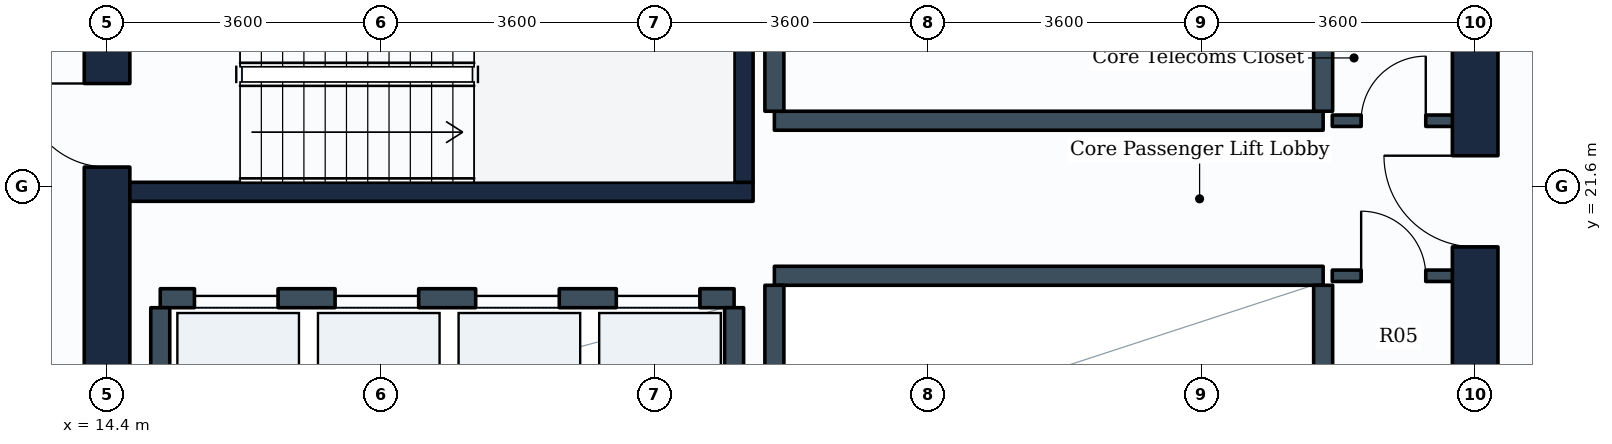
"""IFC4 building model, lengths in metres.
Left out: names, types, materials, properties, quantities, classifications, styles, units other than length and angle.
Written with IfcOpenShell. Run it as: python <this file> out.ifc"""

import sys

from ifc_helpers import new_model, si_unit, direction, frame, frame_2d, origin, place, context, subcontext, project, spatial, rectangle, extrude, element, fill, save


model = new_model("IFC4")
c1 = context("Model", 3, precision=1e-05, world=origin(), true_north=direction((0.0, 1.0)))
c2 = subcontext(c1, "Body", "Model", "MODEL_VIEW")
j1 = project(units=[si_unit("LENGTHUNIT", "METRE"), si_unit("PLANEANGLEUNIT", "RADIAN")], contexts=[c1])
p1 = place(None, origin())
s1 = spatial("IfcSite", under=j1, at=p1, CompositionType="ELEMENT")
p2 = place(p1, origin())
s2 = spatial("IfcBuilding", under=s1, at=p2, CompositionType="ELEMENT")
p3 = place(p2, frame((0.0, 0.0, 84.0)))
s3 = spatial("IfcBuildingStorey", under=s2, at=p3, CompositionType="ELEMENT", Elevation=84.0)
p4 = place(p3, frame((14.4, 10.8, 0.0), z_axis=(0.0, 0.0, 1.0), x_axis=(0.0, 1.0, 0.0)))
e1 = element("IfcWall", 1, at=p4, inside=s3, PredefinedType="SHEAR", context=c2, shape_type="SweptSolid", body=[
    extrude(rectangle(XDim=14.4, YDim=0.6, at=frame_2d((7.2, 0.0))), origin(), (0.0, 0.0, 1.0), 3.65),
])
p5 = place(p4, frame((11.05, 0.0, 0.0)))
e2 = element("IfcOpeningElement", 2, at=p5, cuts=e1, PredefinedType="OPENING", context=c2, shape_type="SweptSolid", body=[
    extrude(rectangle(XDim=1.1, YDim=2.1, at=frame_2d((0.55, 1.05))), frame((0.0, 0.31, 0.0), z_axis=(0.0, -1.0, 0.0), x_axis=(1.0, 0.0, 0.0)), (0.0, 0.0, 1.0), 0.62),
])
p6 = place(p4, frame((4.9, 0.0, 0.0)))
e3 = element("IfcOpeningElement", 3, at=p6, cuts=e1, PredefinedType="OPENING", context=c2, shape_type="SweptSolid", body=[
    extrude(rectangle(XDim=1.2, YDim=2.1, at=frame_2d((0.6, 1.05))), frame((0.0, 0.31, 0.0), z_axis=(0.0, -1.0, 0.0), x_axis=(1.0, 0.0, 0.0)), (0.0, 0.0, 1.0), 0.62),
])
p7 = place(p3, frame((32.4, 10.8, 0.0), z_axis=(0.0, 0.0, 1.0), x_axis=(0.0, 1.0, 0.0)))
e4 = element("IfcWall", 4, at=p7, inside=s3, PredefinedType="SHEAR", context=c2, shape_type="SweptSolid", body=[
    extrude(rectangle(XDim=14.4, YDim=0.6, at=frame_2d((7.2, 0.0))), origin(), (0.0, 0.0, 1.0), 3.65),
])
p8 = place(p7, frame((4.35, 0.0, 0.0)))
e5 = element("IfcOpeningElement", 5, at=p8, cuts=e4, PredefinedType="OPENING", context=c2, shape_type="SweptSolid", body=[
    extrude(rectangle(XDim=1.2, YDim=2.1, at=frame_2d((0.6, 1.05))), frame((0.0, 0.31, 0.0), z_axis=(0.0, -1.0, 0.0), x_axis=(1.0, 0.0, 0.0)), (0.0, 0.0, 1.0), 0.62),
])
p9 = place(p7, frame((10.0, 0.0, 0.0)))
e6 = element("IfcOpeningElement", 6, at=p9, cuts=e4, PredefinedType="OPENING", context=c2, shape_type="SweptSolid", body=[
    extrude(rectangle(XDim=1.2, YDim=2.1, at=frame_2d((0.6, 1.05))), frame((0.0, 0.31, 0.0), z_axis=(0.0, -1.0, 0.0), x_axis=(1.0, 0.0, 0.0)), (0.0, 0.0, 1.0), 0.62),
])
p10 = place(p3, frame((14.7, 21.525, 0.0), z_axis=(0.0, 0.0, 1.0), x_axis=(1.0, 0.0, 0.0)))
e7 = element("IfcWall", 7, at=p10, inside=s3, PredefinedType="SHEAR", context=c2, shape_type="SweptSolid", body=[
    extrude(rectangle(XDim=8.2, YDim=0.25, at=frame_2d((4.1, 0.0))), origin(), (0.0, 0.0, 1.0), 3.65),
])
p11 = place(p3, frame((22.775, 21.65, 0.0), z_axis=(0.0, 0.0, 1.0), x_axis=(0.0, 1.0, 0.0)))
e8 = element("IfcWall", 8, at=p11, inside=s3, PredefinedType="SHEAR", context=c2, shape_type="SweptSolid", body=[
    extrude(rectangle(XDim=2.84, YDim=0.25, at=frame_2d((1.42, 0.0))), origin(), (0.0, 0.0, 1.0), 3.65),
])
p12 = place(p3, frame((15.1, 20.125, 0.0), z_axis=(0.0, 0.0, 1.0), x_axis=(1.0, 0.0, 0.0)))
e9 = element("IfcWall", 9, at=p12, inside=s3, PredefinedType="PARTITIONING", context=c2, shape_type="SweptSolid", body=[
    extrude(rectangle(XDim=7.55, YDim=0.25, at=frame_2d((3.775, 0.0))), origin(), (0.0, 0.0, 1.0), 3.635),
])
p13 = place(p12, frame((0.45, 0.0, 0.0)))
e10 = element("IfcOpeningElement", 10, at=p13, cuts=e9, PredefinedType="OPENING", context=c2, shape_type="SweptSolid", body=[
    extrude(rectangle(XDim=1.1, YDim=2.1, at=frame_2d((0.55, 1.05))), frame((0.0, 0.135, 0.0), z_axis=(0.0, -1.0, 0.0), x_axis=(1.0, 0.0, 0.0)), (0.0, 0.0, 1.0), 0.27),
])
p14 = place(p12, frame((2.3, 0.0, 0.0)))
e11 = element("IfcOpeningElement", 11, at=p14, cuts=e9, PredefinedType="OPENING", context=c2, shape_type="SweptSolid", body=[
    extrude(rectangle(XDim=1.1, YDim=2.1, at=frame_2d((0.55, 1.05))), frame((0.0, 0.135, 0.0), z_axis=(0.0, -1.0, 0.0), x_axis=(1.0, 0.0, 0.0)), (0.0, 0.0, 1.0), 0.27),
])
p15 = place(p12, frame((4.15, 0.0, 0.0)))
e12 = element("IfcOpeningElement", 12, at=p15, cuts=e9, PredefinedType="OPENING", context=c2, shape_type="SweptSolid", body=[
    extrude(rectangle(XDim=1.1, YDim=2.1, at=frame_2d((0.55, 1.05))), frame((0.0, 0.135, 0.0), z_axis=(0.0, -1.0, 0.0), x_axis=(1.0, 0.0, 0.0)), (0.0, 0.0, 1.0), 0.27),
])
p16 = place(p12, frame((6.0, 0.0, 0.0)))
e13 = element("IfcOpeningElement", 13, at=p16, cuts=e9, PredefinedType="OPENING", context=c2, shape_type="SweptSolid", body=[
    extrude(rectangle(XDim=1.1, YDim=2.1, at=frame_2d((0.55, 1.05))), frame((0.0, 0.135, 0.0), z_axis=(0.0, -1.0, 0.0), x_axis=(1.0, 0.0, 0.0)), (0.0, 0.0, 1.0), 0.27),
])
for number, where, z_axis, x_axis in (
    (14, (15.1, 18.025, 0.0), (0.0, 0.0, 1.0), (0.0, 1.0, 0.0)),
    (15, (22.65, 18.025, 0.0), (0.0, 0.0, 1.0), (0.0, 1.0, 0.0)),
):
    element("IfcWall", number, at=place(p3, frame(where, z_axis=z_axis, x_axis=x_axis)), inside=s3, PredefinedType="PARTITIONING", context=c2, shape_type="SweptSolid", body=[
        extrude(rectangle(XDim=1.975, YDim=0.25, at=frame_2d((0.988, 0.0))), origin(), (0.0, 0.0, 1.0), 3.635),
    ])
p17 = place(p3, frame((23.18, 20.42, 0.0), z_axis=(0.0, 0.0, 1.0), x_axis=(1.0, 0.0, 0.0)))
e16 = element("IfcWall", 16, at=p17, inside=s3, PredefinedType="PARTITIONING", context=c2, shape_type="SweptSolid", body=[
    extrude(rectangle(XDim=7.22, YDim=0.25, at=frame_2d((3.61, 0.0))), origin(), (0.0, 0.0, 1.0), 3.635),
])
for number, where, z_axis, x_axis in (
    (17, (23.18, 18.025, 0.0), (0.0, 0.0, 1.0), (0.0, 1.0, 0.0)),
    (18, (30.4, 18.025, 0.0), (0.0, 0.0, 1.0), (0.0, 1.0, 0.0)),
):
    element("IfcWall", number, at=place(p3, frame(where, z_axis=z_axis, x_axis=x_axis)), inside=s3, PredefinedType="PARTITIONING", context=c2, shape_type="SweptSolid", body=[
        extrude(rectangle(XDim=2.27, YDim=0.25, at=frame_2d((1.135, 0.0))), origin(), (0.0, 0.0, 1.0), 3.635),
    ])
p18 = place(p3, frame((23.18, 22.46, 0.0), z_axis=(0.0, 0.0, 1.0), x_axis=(1.0, 0.0, 0.0)))
e19 = element("IfcWall", 19, at=p18, inside=s3, PredefinedType="PARTITIONING", context=c2, shape_type="SweptSolid", body=[
    extrude(rectangle(XDim=7.22, YDim=0.25, at=frame_2d((3.61, 0.0))), origin(), (0.0, 0.0, 1.0), 3.635),
])
for number, where, z_axis, x_axis in (
    (20, (23.18, 22.585, 0.0), (0.0, 0.0, 1.0), (0.0, 1.0, 0.0)),
    (21, (30.4, 22.585, 0.0), (0.0, 0.0, 1.0), (0.0, 1.0, 0.0)),
):
    element("IfcWall", number, at=place(p3, frame(where, z_axis=z_axis, x_axis=x_axis)), inside=s3, PredefinedType="PARTITIONING", context=c2, shape_type="SweptSolid", body=[
        extrude(rectangle(XDim=2.315, YDim=0.25, at=frame_2d((1.157, 0.0))), origin(), (0.0, 0.0, 1.0), 3.635),
    ])
p19 = place(p3, frame((30.52, 22.46, 0.0), z_axis=(0.0, 0.0, 1.0), x_axis=(1.0, 0.0, 0.0)))
e22 = element("IfcWall", 22, at=p19, inside=s3, PredefinedType="PARTITIONING", context=c2, shape_type="SweptSolid", body=[
    extrude(rectangle(XDim=1.63, YDim=0.15, at=frame_2d((0.815, 0.0))), origin(), (0.0, 0.0, 1.0), 3.635),
])
p20 = place(p19, frame((0.38, 0.0, 0.0)))
e23 = element("IfcOpeningElement", 23, at=p20, cuts=e22, PredefinedType="OPENING", context=c2, shape_type="SweptSolid", body=[
    extrude(rectangle(XDim=0.85, YDim=2.1, at=frame_2d((0.425, 1.05))), frame((0.0, 0.085, 0.0), z_axis=(0.0, -1.0, 0.0), x_axis=(1.0, 0.0, 0.0)), (0.0, 0.0, 1.0), 0.17),
])
p21 = place(p3, frame((30.52, 20.42, 0.0), z_axis=(0.0, 0.0, 1.0), x_axis=(1.0, 0.0, 0.0)))
e24 = element("IfcWall", 24, at=p21, inside=s3, PredefinedType="PARTITIONING", context=c2, shape_type="SweptSolid", body=[
    extrude(rectangle(XDim=1.63, YDim=0.15, at=frame_2d((0.815, 0.0))), origin(), (0.0, 0.0, 1.0), 3.635),
])
p22 = place(p21, frame((0.38, 0.0, 0.0)))
e25 = element("IfcOpeningElement", 25, at=p22, cuts=e24, PredefinedType="OPENING", context=c2, shape_type="SweptSolid", body=[
    extrude(rectangle(XDim=0.85, YDim=2.1, at=frame_2d((0.425, 1.05))), frame((0.0, 0.085, 0.0), z_axis=(0.0, -1.0, 0.0), x_axis=(1.0, 0.0, 0.0)), (0.0, 0.0, 1.0), 0.17),
])
p23 = place(p5, origin())
e26 = element("IfcDoor", 26, at=p23, inside=s3, OperationType="SINGLE_SWING_RIGHT", PredefinedType="DOOR", context=c2, shape_type="SweptSolid", body=[
    extrude(rectangle(XDim=1.1, YDim=2.1, at=frame_2d((0.55, 1.05))), frame((0.0, 0.025, 0.0), z_axis=(0.0, -1.0, 0.0), x_axis=(1.0, 0.0, 0.0)), (0.0, 0.0, 1.0), 0.05),
])
fill(e2, e26)
p24 = place(p13, origin())
e27 = element("IfcDoor", 27, at=p24, inside=s3, OperationType="SLIDING_TO_LEFT", PredefinedType="DOOR", context=c2, shape_type="SweptSolid", body=[
    extrude(rectangle(XDim=1.1, YDim=2.1, at=frame_2d((0.55, 1.05))), frame((0.0, 0.025, 0.0), z_axis=(0.0, -1.0, 0.0), x_axis=(1.0, 0.0, 0.0)), (0.0, 0.0, 1.0), 0.05),
])
fill(e10, e27)
p25 = place(p14, origin())
e28 = element("IfcDoor", 28, at=p25, inside=s3, OperationType="SLIDING_TO_LEFT", PredefinedType="DOOR", context=c2, shape_type="SweptSolid", body=[
    extrude(rectangle(XDim=1.1, YDim=2.1, at=frame_2d((0.55, 1.05))), frame((0.0, 0.025, 0.0), z_axis=(0.0, -1.0, 0.0), x_axis=(1.0, 0.0, 0.0)), (0.0, 0.0, 1.0), 0.05),
])
fill(e11, e28)
p26 = place(p15, origin())
e29 = element("IfcDoor", 29, at=p26, inside=s3, OperationType="SLIDING_TO_LEFT", PredefinedType="DOOR", context=c2, shape_type="SweptSolid", body=[
    extrude(rectangle(XDim=1.1, YDim=2.1, at=frame_2d((0.55, 1.05))), frame((0.0, 0.025, 0.0), z_axis=(0.0, -1.0, 0.0), x_axis=(1.0, 0.0, 0.0)), (0.0, 0.0, 1.0), 0.05),
])
fill(e12, e29)
p27 = place(p16, origin())
e30 = element("IfcDoor", 30, at=p27, inside=s3, OperationType="SLIDING_TO_LEFT", PredefinedType="DOOR", context=c2, shape_type="SweptSolid", body=[
    extrude(rectangle(XDim=1.1, YDim=2.1, at=frame_2d((0.55, 1.05))), frame((0.0, 0.025, 0.0), z_axis=(0.0, -1.0, 0.0), x_axis=(1.0, 0.0, 0.0)), (0.0, 0.0, 1.0), 0.05),
])
fill(e13, e30)
p28 = place(p9, origin())
e31 = element("IfcDoor", 31, at=p28, inside=s3, OperationType="SINGLE_SWING_RIGHT", PredefinedType="DOOR", context=c2, shape_type="SweptSolid", body=[
    extrude(rectangle(XDim=1.2, YDim=2.1, at=frame_2d((0.6, 1.05))), frame((0.0, 0.025, 0.0), z_axis=(0.0, -1.0, 0.0), x_axis=(1.0, 0.0, 0.0)), (0.0, 0.0, 1.0), 0.05),
])
fill(e6, e31)
p29 = place(p20, origin())
e32 = element("IfcDoor", 32, at=p29, inside=s3, OperationType="SINGLE_SWING_RIGHT", PredefinedType="DOOR", context=c2, shape_type="SweptSolid", body=[
    extrude(rectangle(XDim=0.85, YDim=2.1, at=frame_2d((0.425, 1.05))), frame((0.0, 0.025, 0.0), z_axis=(0.0, -1.0, 0.0), x_axis=(1.0, 0.0, 0.0)), (0.0, 0.0, 1.0), 0.05),
])
fill(e23, e32)
p30 = place(p22, origin())
e33 = element("IfcDoor", 33, at=p30, inside=s3, OperationType="SINGLE_SWING_LEFT", PredefinedType="DOOR", context=c2, shape_type="SweptSolid", body=[
    extrude(rectangle(XDim=0.85, YDim=2.1, at=frame_2d((0.425, 1.05))), frame((0.0, 0.025, 0.0), z_axis=(0.0, -1.0, 0.0), x_axis=(1.0, 0.0, 0.0)), (0.0, 0.0, 1.0), 0.05),
])
fill(e25, e33)
save(model, sys.argv[1])
